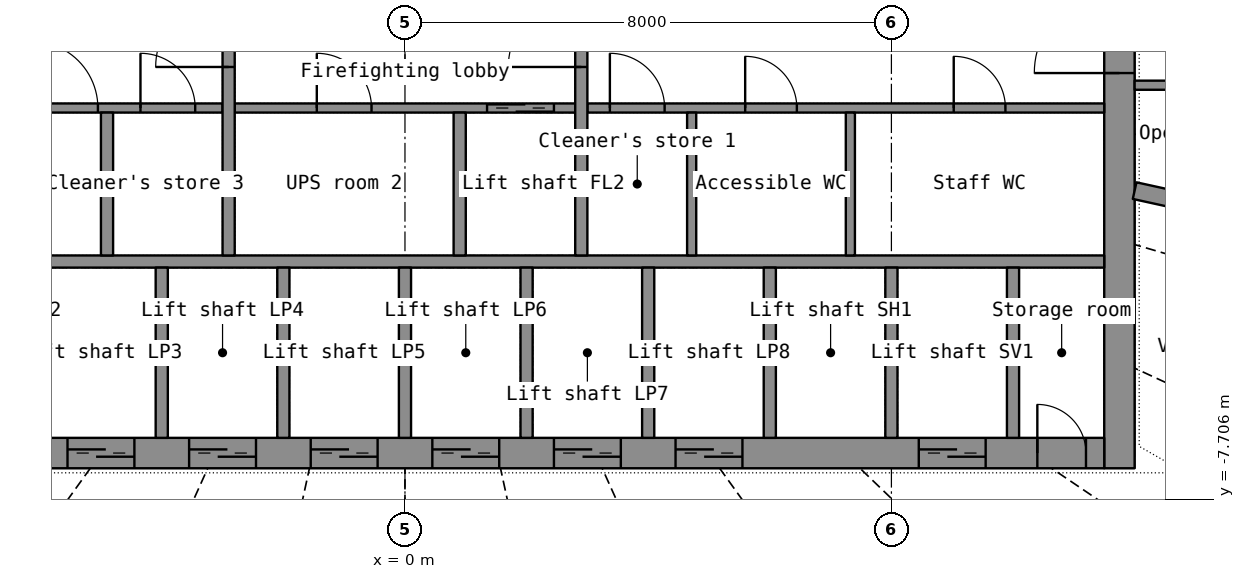
"""IFC4 building model, lengths in metres.
Left out: names, types, materials, properties, quantities, classifications, styles, units other than length and angle.
Written with IfcOpenShell. Run it as: python <this file> out.ifc"""

import sys

from ifc_helpers import new_model, si_unit, direction, frame, frame_2d, origin, place, context, subcontext, project, spatial, rectangle, extrude, element, fill, save


model = new_model("IFC4")
c1 = context("Model", 3, precision=1e-05, world=origin(), true_north=direction((0.0, 1.0)))
c2 = subcontext(c1, "Body", "Model", "MODEL_VIEW")
j1 = project(units=[si_unit("LENGTHUNIT", "METRE"), si_unit("PLANEANGLEUNIT", "RADIAN")], contexts=[c1])
p1 = place(None, origin())
s1 = spatial("IfcSite", under=j1, at=p1, CompositionType="ELEMENT")
p2 = place(p1, origin())
s2 = spatial("IfcBuilding", under=s1, at=p2, CompositionType="ELEMENT")
p3 = place(p2, frame((0.0, 0.0, 137.8)))
s3 = spatial("IfcBuildingStorey", under=s2, at=p3, CompositionType="ELEMENT", Elevation=137.8)
p4 = place(p3, frame((11.75, -7.2, 0.0), z_axis=(0.0, 0.0, 1.0), x_axis=(0.0, 1.0, 0.0)))
e1 = element("IfcWall", 1, at=p4, inside=s3, PredefinedType="SHEAR", context=c2, shape_type="SweptSolid", body=[
    extrude(rectangle(XDim=14.4, YDim=0.5, at=frame_2d((7.2, 0.0))), origin(), (0.0, 0.0, 1.0), 3.3),
])
p5 = place(p4, frame((6.5, 0.0, 0.0)))
e2 = element("IfcOpeningElement", 2, at=p5, cuts=e1, PredefinedType="OPENING", context=c2, shape_type="SweptSolid", body=[
    extrude(rectangle(XDim=1.4, YDim=2.2, at=frame_2d((0.7, 1.1))), frame((0.0, 0.26, 0.0), z_axis=(0.0, -1.0, 0.0), x_axis=(1.0, 0.0, 0.0)), (0.0, 0.0, 1.0), 0.52),
])
p6 = place(p3, frame((-11.5, -6.95, 0.0), z_axis=(0.0, 0.0, 1.0), x_axis=(1.0, 0.0, 0.0)))
e3 = element("IfcWall", 3, at=p6, inside=s3, PredefinedType="SHEAR", context=c2, shape_type="SweptSolid", body=[
    extrude(rectangle(XDim=23.0, YDim=0.5, at=frame_2d((11.5, 0.0))), origin(), (0.0, 0.0, 1.0), 3.3),
])
p7 = place(p6, frame((1.95, 0.0, 0.0)))
e4 = element("IfcOpeningElement", 4, at=p7, cuts=e3, PredefinedType="OPENING", context=c2, shape_type="SweptSolid", body=[
    extrude(rectangle(XDim=1.1, YDim=2.2, at=frame_2d((0.55, 1.1))), frame((0.0, 0.26, 0.0), z_axis=(0.0, -1.0, 0.0), x_axis=(1.0, 0.0, 0.0)), (0.0, 0.0, 1.0), 0.52),
])
p8 = place(p6, frame((3.95, 0.0, 0.0)))
e5 = element("IfcOpeningElement", 5, at=p8, cuts=e3, PredefinedType="OPENING", context=c2, shape_type="SweptSolid", body=[
    extrude(rectangle(XDim=1.1, YDim=2.2, at=frame_2d((0.55, 1.1))), frame((0.0, 0.26, 0.0), z_axis=(0.0, -1.0, 0.0), x_axis=(1.0, 0.0, 0.0)), (0.0, 0.0, 1.0), 0.52),
])
p9 = place(p6, frame((5.95, 0.0, 0.0)))
e6 = element("IfcOpeningElement", 6, at=p9, cuts=e3, PredefinedType="OPENING", context=c2, shape_type="SweptSolid", body=[
    extrude(rectangle(XDim=1.1, YDim=2.2, at=frame_2d((0.55, 1.1))), frame((0.0, 0.26, 0.0), z_axis=(0.0, -1.0, 0.0), x_axis=(1.0, 0.0, 0.0)), (0.0, 0.0, 1.0), 0.52),
])
p10 = place(p6, frame((7.95, 0.0, 0.0)))
e7 = element("IfcOpeningElement", 7, at=p10, cuts=e3, PredefinedType="OPENING", context=c2, shape_type="SweptSolid", body=[
    extrude(rectangle(XDim=1.1, YDim=2.2, at=frame_2d((0.55, 1.1))), frame((0.0, 0.26, 0.0), z_axis=(0.0, -1.0, 0.0), x_axis=(1.0, 0.0, 0.0)), (0.0, 0.0, 1.0), 0.52),
])
p11 = place(p6, frame((9.95, 0.0, 0.0)))
e8 = element("IfcOpeningElement", 8, at=p11, cuts=e3, PredefinedType="OPENING", context=c2, shape_type="SweptSolid", body=[
    extrude(rectangle(XDim=1.1, YDim=2.2, at=frame_2d((0.55, 1.1))), frame((0.0, 0.26, 0.0), z_axis=(0.0, -1.0, 0.0), x_axis=(1.0, 0.0, 0.0)), (0.0, 0.0, 1.0), 0.52),
])
p12 = place(p6, frame((11.95, 0.0, 0.0)))
e9 = element("IfcOpeningElement", 9, at=p12, cuts=e3, PredefinedType="OPENING", context=c2, shape_type="SweptSolid", body=[
    extrude(rectangle(XDim=1.1, YDim=2.2, at=frame_2d((0.55, 1.1))), frame((0.0, 0.26, 0.0), z_axis=(0.0, -1.0, 0.0), x_axis=(1.0, 0.0, 0.0)), (0.0, 0.0, 1.0), 0.52),
])
p13 = place(p6, frame((13.95, 0.0, 0.0)))
e10 = element("IfcOpeningElement", 10, at=p13, cuts=e3, PredefinedType="OPENING", context=c2, shape_type="SweptSolid", body=[
    extrude(rectangle(XDim=1.1, YDim=2.2, at=frame_2d((0.55, 1.1))), frame((0.0, 0.26, 0.0), z_axis=(0.0, -1.0, 0.0), x_axis=(1.0, 0.0, 0.0)), (0.0, 0.0, 1.0), 0.52),
])
p14 = place(p6, frame((15.95, 0.0, 0.0)))
e11 = element("IfcOpeningElement", 11, at=p14, cuts=e3, PredefinedType="OPENING", context=c2, shape_type="SweptSolid", body=[
    extrude(rectangle(XDim=1.1, YDim=2.2, at=frame_2d((0.55, 1.1))), frame((0.0, 0.26, 0.0), z_axis=(0.0, -1.0, 0.0), x_axis=(1.0, 0.0, 0.0)), (0.0, 0.0, 1.0), 0.52),
])
p15 = place(p6, frame((19.95, 0.0, 0.0)))
e12 = element("IfcOpeningElement", 12, at=p15, cuts=e3, PredefinedType="OPENING", context=c2, shape_type="SweptSolid", body=[
    extrude(rectangle(XDim=1.1, YDim=2.2, at=frame_2d((0.55, 1.1))), frame((0.0, 0.26, 0.0), z_axis=(0.0, -1.0, 0.0), x_axis=(1.0, 0.0, 0.0)), (0.0, 0.0, 1.0), 0.52),
])
p16 = place(p6, frame((0.3, 0.0, 0.0)))
e13 = element("IfcOpeningElement", 13, at=p16, cuts=e3, PredefinedType="OPENING", context=c2, shape_type="SweptSolid", body=[
    extrude(rectangle(XDim=0.8, YDim=2.05, at=frame_2d((0.4, 1.025))), frame((0.0, 0.26, 0.0), z_axis=(0.0, -1.0, 0.0), x_axis=(1.0, 0.0, 0.0)), (0.0, 0.0, 1.0), 0.52),
])
p17 = place(p6, frame((21.9, 0.0, 0.0)))
e14 = element("IfcOpeningElement", 14, at=p17, cuts=e3, PredefinedType="OPENING", context=c2, shape_type="SweptSolid", body=[
    extrude(rectangle(XDim=0.8, YDim=2.05, at=frame_2d((0.4, 1.025))), frame((0.0, 0.26, 0.0), z_axis=(0.0, -1.0, 0.0), x_axis=(1.0, 0.0, 0.0)), (0.0, 0.0, 1.0), 0.52),
])
p18 = place(p3, frame((-11.5, -3.8, 0.0), z_axis=(0.0, 0.0, 1.0), x_axis=(1.0, 0.0, 0.0)))
e15 = element("IfcWall", 15, at=p18, inside=s3, PredefinedType="SHEAR", context=c2, shape_type="SweptSolid", body=[
    extrude(rectangle(XDim=23.0, YDim=0.2, at=frame_2d((11.5, 0.0))), origin(), (0.0, 0.0, 1.0), 3.3),
])
for number, where, z_axis, x_axis in (
    (16, (-4.0, -6.7, 0.0), (0.0, 0.0, 1.0), (0.0, 1.0, 0.0)),
    (17, (-2.0, -6.7, 0.0), (0.0, 0.0, 1.0), (0.0, 1.0, 0.0)),
    (18, (0.0, -6.7, 0.0), (0.0, 0.0, 1.0), (0.0, 1.0, 0.0)),
    (19, (2.0, -6.7, 0.0), (0.0, 0.0, 1.0), (0.0, 1.0, 0.0)),
    (20, (4.0, -6.7, 0.0), (0.0, 0.0, 1.0), (0.0, 1.0, 0.0)),
    (21, (6.0, -6.7, 0.0), (0.0, 0.0, 1.0), (0.0, 1.0, 0.0)),
    (22, (8.0, -6.7, 0.0), (0.0, 0.0, 1.0), (0.0, 1.0, 0.0)),
    (23, (10.0, -6.7, 0.0), (0.0, 0.0, 1.0), (0.0, 1.0, 0.0)),
):
    element("IfcWall", number, at=place(p3, frame(where, z_axis=z_axis, x_axis=x_axis)), inside=s3, PredefinedType="SHEAR", context=c2, shape_type="SweptSolid", body=[
        extrude(rectangle(XDim=2.8, YDim=0.2, at=frame_2d((1.4, 0.0))), origin(), (0.0, 0.0, 1.0), 3.3),
    ])
p19 = place(p3, frame((-11.5, -1.275, 0.0), z_axis=(0.0, 0.0, 1.0), x_axis=(1.0, 0.0, 0.0)))
e24 = element("IfcWall", 24, at=p19, inside=s3, PredefinedType="SHEAR", context=c2, shape_type="SweptSolid", body=[
    extrude(rectangle(XDim=8.5, YDim=0.15, at=frame_2d((4.25, 0.0))), origin(), (0.0, 0.0, 1.0), 3.3),
])
p20 = place(p19, frame((5.35, 0.0, 0.0)))
e25 = element("IfcOpeningElement", 25, at=p20, cuts=e24, PredefinedType="OPENING", context=c2, shape_type="SweptSolid", body=[
    extrude(rectangle(XDim=1.1, YDim=2.15, at=frame_2d((0.55, 1.075))), frame((0.0, 0.085, 0.0), z_axis=(0.0, -1.0, 0.0), x_axis=(1.0, 0.0, 0.0)), (0.0, 0.0, 1.0), 0.17),
])
p21 = place(p19, frame((7.15, 0.0, 0.0)))
e26 = element("IfcOpeningElement", 26, at=p21, cuts=e24, PredefinedType="OPENING", context=c2, shape_type="SweptSolid", body=[
    extrude(rectangle(XDim=0.9, YDim=2.1, at=frame_2d((0.45, 1.05))), frame((0.0, 0.085, 0.0), z_axis=(0.0, -1.0, 0.0), x_axis=(1.0, 0.0, 0.0)), (0.0, 0.0, 1.0), 0.17),
])
p22 = place(p3, frame((-2.8, -1.275, 0.0), z_axis=(0.0, 0.0, 1.0), x_axis=(1.0, 0.0, 0.0)))
e27 = element("IfcWall", 27, at=p22, inside=s3, PredefinedType="SHEAR", context=c2, shape_type="SweptSolid", body=[
    extrude(rectangle(XDim=5.6, YDim=0.15, at=frame_2d((2.8, 0.0))), origin(), (0.0, 0.0, 1.0), 3.3),
])
p23 = place(p22, frame((4.15, 0.0, 0.0)))
e28 = element("IfcOpeningElement", 28, at=p23, cuts=e27, PredefinedType="OPENING", context=c2, shape_type="SweptSolid", body=[
    extrude(rectangle(XDim=1.1, YDim=2.2, at=frame_2d((0.55, 1.1))), frame((0.0, 0.085, 0.0), z_axis=(0.0, -1.0, 0.0), x_axis=(1.0, 0.0, 0.0)), (0.0, 0.0, 1.0), 0.17),
])
p24 = place(p22, frame((1.35, 0.0, 0.0)))
e29 = element("IfcOpeningElement", 29, at=p24, cuts=e27, PredefinedType="OPENING", context=c2, shape_type="SweptSolid", body=[
    extrude(rectangle(XDim=0.9, YDim=2.1, at=frame_2d((0.45, 1.05))), frame((0.0, 0.085, 0.0), z_axis=(0.0, -1.0, 0.0), x_axis=(1.0, 0.0, 0.0)), (0.0, 0.0, 1.0), 0.17),
])
p25 = place(p3, frame((3.0, -1.275, 0.0), z_axis=(0.0, 0.0, 1.0), x_axis=(1.0, 0.0, 0.0)))
e30 = element("IfcWall", 30, at=p25, inside=s3, PredefinedType="PARTITIONING", context=c2, shape_type="SweptSolid", body=[
    extrude(rectangle(XDim=8.5, YDim=0.15, at=frame_2d((4.25, 0.0))), origin(), (0.0, 0.0, 1.0), 3.3),
])
p26 = place(p25, frame((0.37, 0.0, 0.0)))
e31 = element("IfcOpeningElement", 31, at=p26, cuts=e30, PredefinedType="OPENING", context=c2, shape_type="SweptSolid", body=[
    extrude(rectangle(XDim=0.9, YDim=2.1, at=frame_2d((0.45, 1.05))), frame((0.0, 0.085, 0.0), z_axis=(0.0, -1.0, 0.0), x_axis=(1.0, 0.0, 0.0)), (0.0, 0.0, 1.0), 0.17),
])
p27 = place(p25, frame((2.595, 0.0, 0.0)))
e32 = element("IfcOpeningElement", 32, at=p27, cuts=e30, PredefinedType="OPENING", context=c2, shape_type="SweptSolid", body=[
    extrude(rectangle(XDim=0.85, YDim=2.1, at=frame_2d((0.425, 1.05))), frame((0.0, 0.085, 0.0), z_axis=(0.0, -1.0, 0.0), x_axis=(1.0, 0.0, 0.0)), (0.0, 0.0, 1.0), 0.17),
])
p28 = place(p25, frame((6.025, 0.0, 0.0)))
e33 = element("IfcOpeningElement", 33, at=p28, cuts=e30, PredefinedType="OPENING", context=c2, shape_type="SweptSolid", body=[
    extrude(rectangle(XDim=0.85, YDim=2.1, at=frame_2d((0.425, 1.05))), frame((0.0, 0.085, 0.0), z_axis=(0.0, -1.0, 0.0), x_axis=(1.0, 0.0, 0.0)), (0.0, 0.0, 1.0), 0.17),
])
p29 = place(p3, frame((-2.9, -3.7, 0.0), z_axis=(0.0, 0.0, 1.0), x_axis=(0.0, 1.0, 0.0)))
e34 = element("IfcWall", 34, at=p29, inside=s3, PredefinedType="SHEAR", context=c2, shape_type="SweptSolid", body=[
    extrude(rectangle(XDim=7.4, YDim=0.2, at=frame_2d((3.7, 0.0))), origin(), (0.0, 0.0, 1.0), 3.3),
])
p30 = place(p29, frame((3.1, 0.0, 0.0)))
e35 = element("IfcOpeningElement", 35, at=p30, cuts=e34, PredefinedType="OPENING", context=c2, shape_type="SweptSolid", body=[
    extrude(rectangle(XDim=1.2, YDim=2.2, at=frame_2d((0.6, 1.1))), frame((0.0, 0.11, 0.0), z_axis=(0.0, -1.0, 0.0), x_axis=(1.0, 0.0, 0.0)), (0.0, 0.0, 1.0), 0.22),
])
p31 = place(p3, frame((2.9, -3.7, 0.0), z_axis=(0.0, 0.0, 1.0), x_axis=(0.0, 1.0, 0.0)))
e36 = element("IfcWall", 36, at=p31, inside=s3, PredefinedType="SHEAR", context=c2, shape_type="SweptSolid", body=[
    extrude(rectangle(XDim=7.4, YDim=0.2, at=frame_2d((3.7, 0.0))), origin(), (0.0, 0.0, 1.0), 3.3),
])
p32 = place(p31, frame((3.1, 0.0, 0.0)))
e37 = element("IfcOpeningElement", 37, at=p32, cuts=e36, PredefinedType="OPENING", context=c2, shape_type="SweptSolid", body=[
    extrude(rectangle(XDim=1.2, YDim=2.2, at=frame_2d((0.6, 1.1))), frame((0.0, 0.11, 0.0), z_axis=(0.0, -1.0, 0.0), x_axis=(1.0, 0.0, 0.0)), (0.0, 0.0, 1.0), 0.22),
])
for number, where, z_axis, x_axis in (
    (38, (0.9, -3.7, 0.0), (0.0, 0.0, 1.0), (0.0, 1.0, 0.0)),
    (39, (-4.9, -3.7, 0.0), (0.0, 0.0, 1.0), (0.0, 1.0, 0.0)),
):
    element("IfcWall", number, at=place(p3, frame(where, z_axis=z_axis, x_axis=x_axis)), inside=s3, PredefinedType="SHEAR", context=c2, shape_type="SweptSolid", body=[
        extrude(rectangle(XDim=2.35, YDim=0.2, at=frame_2d((1.175, 0.0))), origin(), (0.0, 0.0, 1.0), 3.3),
    ])
for number, where, z_axis, x_axis in (
    (40, (4.715, -3.7, 0.0), (0.0, 0.0, 1.0), (0.0, 1.0, 0.0)),
    (41, (7.325, -3.7, 0.0), (0.0, 0.0, 1.0), (0.0, 1.0, 0.0)),
):
    element("IfcWall", number, at=place(p3, frame(where, z_axis=z_axis, x_axis=x_axis)), inside=s3, PredefinedType="PARTITIONING", context=c2, shape_type="SweptSolid", body=[
        extrude(rectangle(XDim=2.35, YDim=0.15, at=frame_2d((1.175, 0.0))), origin(), (0.0, 0.0, 1.0), 3.3),
    ])
p33 = place(p3, frame((16.0, -3.512, 0.0), z_axis=(0.0, 0.0, 1.0), x_axis=(-0.976750433, 0.214379551, 0.0)))
e42 = element("IfcWall", 42, at=p33, inside=s3, PredefinedType="PARTITIONING", context=c2, shape_type="SweptSolid", body=[
    extrude(rectangle(XDim=4.095, YDim=0.28, at=frame_2d((2.048, 0.0))), origin(), (0.0, 0.0, 1.0), 2.4),
])
p34 = place(p33, frame((1.298, 0.0, 1.0)))
e43 = element("IfcOpeningElement", 43, at=p34, cuts=e42, PredefinedType="OPENING", context=c2, shape_type="SweptSolid", body=[
    extrude(rectangle(XDim=1.5, YDim=1.2, at=frame_2d((0.75, 0.6))), frame((0.0, 0.15, 0.0), z_axis=(0.0, -1.0, 0.0), x_axis=(1.0, 0.0, 0.0)), (0.0, 0.0, 1.0), 0.3),
])
p35 = place(p3, frame((12.0, -0.9, 0.0), z_axis=(0.0, 0.0, 1.0), x_axis=(1.0, 0.0, 0.0)))
e44 = element("IfcWall", 44, at=p35, inside=s3, PredefinedType="PARTITIONING", context=c2, shape_type="SweptSolid", body=[
    extrude(rectangle(XDim=4.0, YDim=0.15, at=frame_2d((2.0, 0.0))), origin(), (0.0, 0.0, 1.0), 2.4),
])
p36 = place(p35, frame((1.4, 0.0, 0.0)))
e45 = element("IfcOpeningElement", 45, at=p36, cuts=e44, PredefinedType="OPENING", context=c2, shape_type="SweptSolid", body=[
    extrude(rectangle(XDim=1.2, YDim=2.2, at=frame_2d((0.6, 1.1))), frame((0.0, 0.085, 0.0), z_axis=(0.0, -1.0, 0.0), x_axis=(1.0, 0.0, 0.0)), (0.0, 0.0, 1.0), 0.17),
])
p37 = place(p9, origin())
e46 = element("IfcDoor", 46, at=p37, inside=s3, OperationType="DOUBLE_DOOR_SLIDING", PredefinedType="DOOR", context=c2, shape_type="SweptSolid", body=[
    extrude(rectangle(XDim=1.1, YDim=2.2, at=frame_2d((0.55, 1.1))), frame((0.0, 0.025, 0.0), z_axis=(0.0, -1.0, 0.0), x_axis=(1.0, 0.0, 0.0)), (0.0, 0.0, 1.0), 0.05),
])
fill(e6, e46)
p38 = place(p10, origin())
e47 = element("IfcDoor", 47, at=p38, inside=s3, OperationType="DOUBLE_DOOR_SLIDING", PredefinedType="DOOR", context=c2, shape_type="SweptSolid", body=[
    extrude(rectangle(XDim=1.1, YDim=2.2, at=frame_2d((0.55, 1.1))), frame((0.0, 0.025, 0.0), z_axis=(0.0, -1.0, 0.0), x_axis=(1.0, 0.0, 0.0)), (0.0, 0.0, 1.0), 0.05),
])
fill(e7, e47)
p39 = place(p11, origin())
e48 = element("IfcDoor", 48, at=p39, inside=s3, OperationType="DOUBLE_DOOR_SLIDING", PredefinedType="DOOR", context=c2, shape_type="SweptSolid", body=[
    extrude(rectangle(XDim=1.1, YDim=2.2, at=frame_2d((0.55, 1.1))), frame((0.0, 0.025, 0.0), z_axis=(0.0, -1.0, 0.0), x_axis=(1.0, 0.0, 0.0)), (0.0, 0.0, 1.0), 0.05),
])
fill(e8, e48)
p40 = place(p12, origin())
e49 = element("IfcDoor", 49, at=p40, inside=s3, OperationType="DOUBLE_DOOR_SLIDING", PredefinedType="DOOR", context=c2, shape_type="SweptSolid", body=[
    extrude(rectangle(XDim=1.1, YDim=2.2, at=frame_2d((0.55, 1.1))), frame((0.0, 0.025, 0.0), z_axis=(0.0, -1.0, 0.0), x_axis=(1.0, 0.0, 0.0)), (0.0, 0.0, 1.0), 0.05),
])
fill(e9, e49)
p41 = place(p13, origin())
e50 = element("IfcDoor", 50, at=p41, inside=s3, OperationType="DOUBLE_DOOR_SLIDING", PredefinedType="DOOR", context=c2, shape_type="SweptSolid", body=[
    extrude(rectangle(XDim=1.1, YDim=2.2, at=frame_2d((0.55, 1.1))), frame((0.0, 0.025, 0.0), z_axis=(0.0, -1.0, 0.0), x_axis=(1.0, 0.0, 0.0)), (0.0, 0.0, 1.0), 0.05),
])
fill(e10, e50)
p42 = place(p14, origin())
e51 = element("IfcDoor", 51, at=p42, inside=s3, OperationType="DOUBLE_DOOR_SLIDING", PredefinedType="DOOR", context=c2, shape_type="SweptSolid", body=[
    extrude(rectangle(XDim=1.1, YDim=2.2, at=frame_2d((0.55, 1.1))), frame((0.0, 0.025, 0.0), z_axis=(0.0, -1.0, 0.0), x_axis=(1.0, 0.0, 0.0)), (0.0, 0.0, 1.0), 0.05),
])
fill(e11, e51)
p43 = place(p15, origin())
e52 = element("IfcDoor", 52, at=p43, inside=s3, OperationType="DOUBLE_DOOR_SLIDING", PredefinedType="DOOR", context=c2, shape_type="SweptSolid", body=[
    extrude(rectangle(XDim=1.1, YDim=2.2, at=frame_2d((0.55, 1.1))), frame((0.0, 0.025, 0.0), z_axis=(0.0, -1.0, 0.0), x_axis=(1.0, 0.0, 0.0)), (0.0, 0.0, 1.0), 0.05),
])
fill(e12, e52)
p44 = place(p17, origin())
e53 = element("IfcDoor", 53, at=p44, inside=s3, OperationType="SINGLE_SWING_LEFT", PredefinedType="DOOR", context=c2, shape_type="SweptSolid", body=[
    extrude(rectangle(XDim=0.8, YDim=2.05, at=frame_2d((0.4, 1.025))), frame((0.0, 0.025, 0.0), z_axis=(0.0, -1.0, 0.0), x_axis=(1.0, 0.0, 0.0)), (0.0, 0.0, 1.0), 0.05),
])
fill(e14, e53)
p45 = place(p5, origin())
e54 = element("IfcDoor", 54, at=p45, inside=s3, OperationType="DOUBLE_DOOR_SINGLE_SWING", PredefinedType="DOOR", context=c2, shape_type="SweptSolid", body=[
    extrude(rectangle(XDim=1.4, YDim=2.2, at=frame_2d((0.7, 1.1))), frame((0.0, 0.025, 0.0), z_axis=(0.0, -1.0, 0.0), x_axis=(1.0, 0.0, 0.0)), (0.0, 0.0, 1.0), 0.05),
])
fill(e2, e54)
p46 = place(p30, origin())
e55 = element("IfcDoor", 55, at=p46, inside=s3, OperationType="SINGLE_SWING_LEFT", PredefinedType="DOOR", context=c2, shape_type="SweptSolid", body=[
    extrude(rectangle(XDim=1.2, YDim=2.2, at=frame_2d((0.6, 1.1))), frame((0.0, 0.025, 0.0), z_axis=(0.0, -1.0, 0.0), x_axis=(1.0, 0.0, 0.0)), (0.0, 0.0, 1.0), 0.05),
])
fill(e35, e55)
p47 = place(p32, origin())
e56 = element("IfcDoor", 56, at=p47, inside=s3, OperationType="SINGLE_SWING_LEFT", PredefinedType="DOOR", context=c2, shape_type="SweptSolid", body=[
    extrude(rectangle(XDim=1.2, YDim=2.2, at=frame_2d((0.6, 1.1))), frame((0.0, 0.025, 0.0), z_axis=(0.0, -1.0, 0.0), x_axis=(1.0, 0.0, 0.0)), (0.0, 0.0, 1.0), 0.05),
])
fill(e37, e56)
p48 = place(p23, origin())
e57 = element("IfcDoor", 57, at=p48, inside=s3, OperationType="DOUBLE_DOOR_SLIDING", PredefinedType="DOOR", context=c2, shape_type="SweptSolid", body=[
    extrude(rectangle(XDim=1.1, YDim=2.2, at=frame_2d((0.55, 1.1))), frame((0.0, 0.025, 0.0), z_axis=(0.0, -1.0, 0.0), x_axis=(1.0, 0.0, 0.0)), (0.0, 0.0, 1.0), 0.05),
])
fill(e28, e57)
p49 = place(p20, origin())
e58 = element("IfcDoor", 58, at=p49, inside=s3, OperationType="SINGLE_SWING_LEFT", PredefinedType="DOOR", context=c2, shape_type="SweptSolid", body=[
    extrude(rectangle(XDim=1.1, YDim=2.15, at=frame_2d((0.55, 1.075))), frame((0.0, 0.025, 0.0), z_axis=(0.0, -1.0, 0.0), x_axis=(1.0, 0.0, 0.0)), (0.0, 0.0, 1.0), 0.05),
])
fill(e25, e58)
p50 = place(p26, origin())
e59 = element("IfcDoor", 59, at=p50, inside=s3, OperationType="SINGLE_SWING_LEFT", PredefinedType="DOOR", context=c2, shape_type="SweptSolid", body=[
    extrude(rectangle(XDim=0.9, YDim=2.1, at=frame_2d((0.45, 1.05))), frame((0.0, 0.025, 0.0), z_axis=(0.0, -1.0, 0.0), x_axis=(1.0, 0.0, 0.0)), (0.0, 0.0, 1.0), 0.05),
])
fill(e31, e59)
p51 = place(p27, origin())
e60 = element("IfcDoor", 60, at=p51, inside=s3, OperationType="SINGLE_SWING_LEFT", PredefinedType="DOOR", context=c2, shape_type="SweptSolid", body=[
    extrude(rectangle(XDim=0.85, YDim=2.1, at=frame_2d((0.425, 1.05))), frame((0.0, 0.025, 0.0), z_axis=(0.0, -1.0, 0.0), x_axis=(1.0, 0.0, 0.0)), (0.0, 0.0, 1.0), 0.05),
])
fill(e32, e60)
p52 = place(p28, origin())
e61 = element("IfcDoor", 61, at=p52, inside=s3, OperationType="SINGLE_SWING_LEFT", PredefinedType="DOOR", context=c2, shape_type="SweptSolid", body=[
    extrude(rectangle(XDim=0.85, YDim=2.1, at=frame_2d((0.425, 1.05))), frame((0.0, 0.025, 0.0), z_axis=(0.0, -1.0, 0.0), x_axis=(1.0, 0.0, 0.0)), (0.0, 0.0, 1.0), 0.05),
])
fill(e33, e61)
p53 = place(p24, origin())
e62 = element("IfcDoor", 62, at=p53, inside=s3, OperationType="SINGLE_SWING_LEFT", PredefinedType="DOOR", context=c2, shape_type="SweptSolid", body=[
    extrude(rectangle(XDim=0.9, YDim=2.1, at=frame_2d((0.45, 1.05))), frame((0.0, 0.025, 0.0), z_axis=(0.0, -1.0, 0.0), x_axis=(1.0, 0.0, 0.0)), (0.0, 0.0, 1.0), 0.05),
])
fill(e29, e62)
p54 = place(p21, origin())
e63 = element("IfcDoor", 63, at=p54, inside=s3, OperationType="SINGLE_SWING_LEFT", PredefinedType="DOOR", context=c2, shape_type="SweptSolid", body=[
    extrude(rectangle(XDim=0.9, YDim=2.1, at=frame_2d((0.45, 1.05))), frame((0.0, 0.025, 0.0), z_axis=(0.0, -1.0, 0.0), x_axis=(1.0, 0.0, 0.0)), (0.0, 0.0, 1.0), 0.05),
])
fill(e26, e63)
save(model, sys.argv[1])
